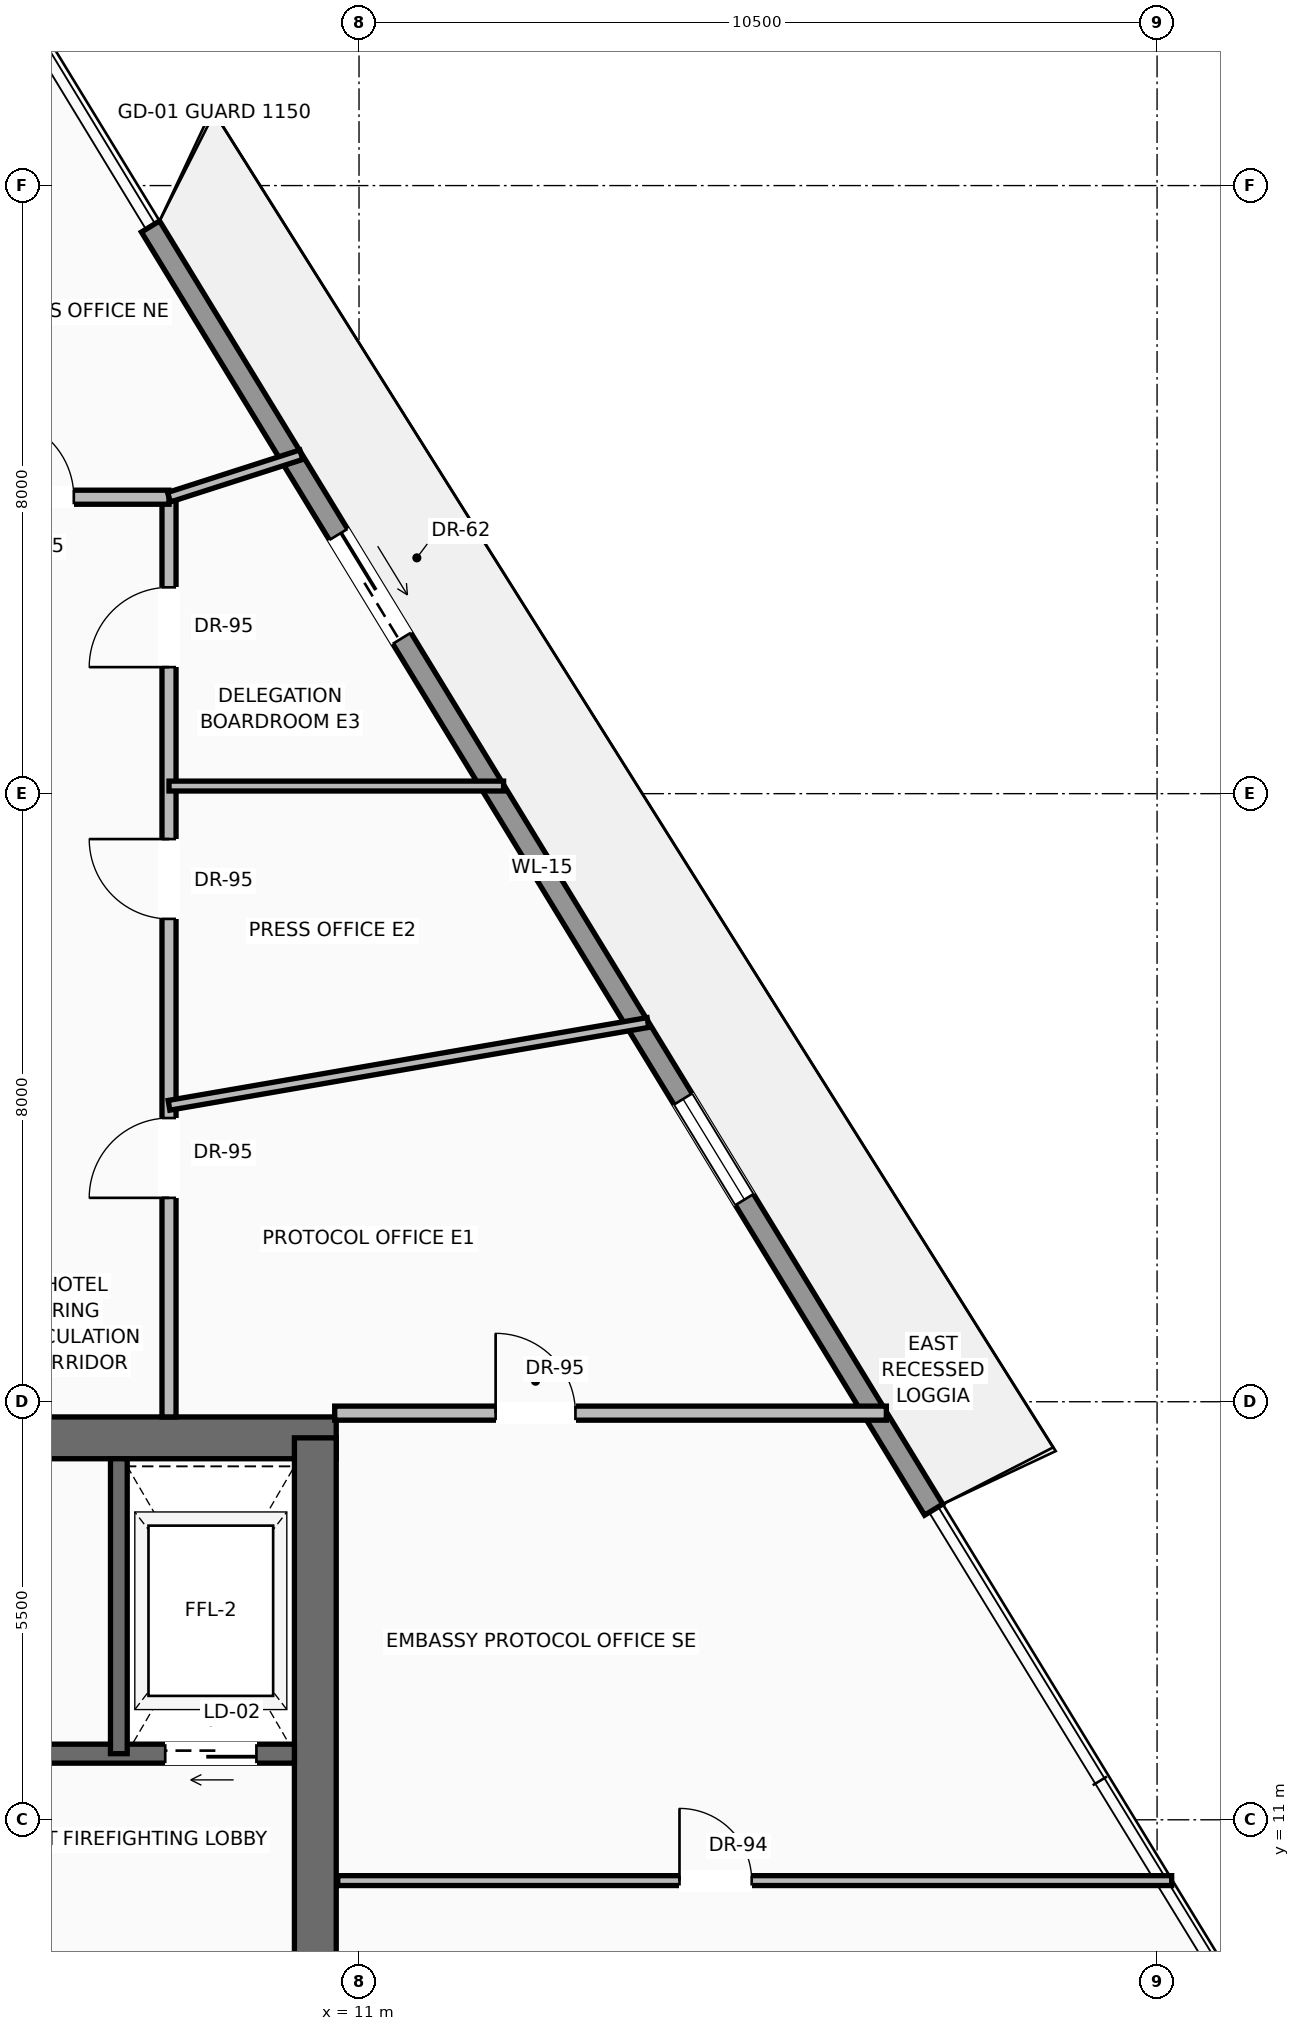
"""IFC4 building model, lengths in metres.
Left out: names, types, materials, properties, quantities, classifications, styles, units other than length and angle.
Written with IfcOpenShell. Run it as: python <this file> out.ifc"""

import sys

from ifc_helpers import new_model, si_unit, direction, frame, frame_2d, origin, place, context, subcontext, project, spatial, rectangle, extrude, source, transform, mapped, element, fill, save


model = new_model("IFC4")
c1 = context("Model", 3, precision=1e-05, world=origin(), true_north=direction((0.0, 1.0)))
c2 = subcontext(c1, "Body", "Model", "MODEL_VIEW")
j1 = project(units=[si_unit("LENGTHUNIT", "METRE"), si_unit("PLANEANGLEUNIT", "RADIAN")], contexts=[c1])
p1 = place(None, origin())
s1 = spatial("IfcSite", under=j1, at=p1, CompositionType="ELEMENT")
p2 = place(p1, origin())
s2 = spatial("IfcBuilding", under=s1, at=p2, CompositionType="ELEMENT")
p3 = place(p2, frame((0.0, 0.0, 251.05)))
s3 = spatial("IfcBuildingStorey", under=s2, at=p3, CompositionType="ELEMENT", Elevation=251.05)
p4 = place(p3, frame((-10.7, 16.025, 0.0), z_axis=(0.0, 0.0, 1.0), x_axis=(1.0, 0.0, 0.0)))
e1 = element("IfcWall", 1, at=p4, inside=s3, PredefinedType="SHEAR", context=c2, shape_type="SweptSolid", body=[
    extrude(rectangle(XDim=21.4, YDim=0.55, at=frame_2d((10.7, 0.0))), origin(), (0.0, 0.0, 1.0), 3.24),
])
p5 = place(p4, frame((3.27, 0.0, 0.0)))
e2 = element("IfcOpeningElement", 2, at=p5, cuts=e1, PredefinedType="OPENING", context=c2, shape_type="SweptSolid", body=[
    extrude(rectangle(XDim=1.3, YDim=2.3, at=frame_2d((0.65, 1.15))), frame((0.0, 0.285, 0.0), z_axis=(0.0, -1.0, 0.0), x_axis=(1.0, 0.0, 0.0)), (0.0, 0.0, 1.0), 0.57),
])
p6 = place(p4, frame((9.7, 0.0, 0.0)))
e3 = element("IfcOpeningElement", 3, at=p6, cuts=e1, PredefinedType="OPENING", context=c2, shape_type="SweptSolid", body=[
    extrude(rectangle(XDim=2.0, YDim=2.4, at=frame_2d((1.0, 1.2))), frame((0.0, 0.285, 0.0), z_axis=(0.0, -1.0, 0.0), x_axis=(1.0, 0.0, 0.0)), (0.0, 0.0, 1.0), 0.57),
])
p7 = place(p3, frame((10.425, 0.575, 0.0), z_axis=(0.0, 0.0, 1.0), x_axis=(0.0, 1.0, 0.0)))
e4 = element("IfcWall", 4, at=p7, inside=s3, PredefinedType="SHEAR", context=c2, shape_type="SweptSolid", body=[
    extrude(rectangle(XDim=15.45, YDim=0.55, at=frame_2d((7.725, 0.0))), origin(), (0.0, 0.0, 1.0), 3.24),
])
p8 = place(p3, frame((8.256, 31.961, 0.0), z_axis=(0.0, 0.0, 1.0), x_axis=(0.521016032817, -0.853546890069, 0.0)))
e5 = element("IfcWall", 5, at=p8, inside=s3, PredefinedType="SOLIDWALL", context=c2, shape_type="SweptSolid", body=[
    extrude(rectangle(XDim=19.778, YDim=0.28, at=frame_2d((9.889, 0.0))), origin(), (0.0, 0.0, 1.0), 2.82),
])
p9 = place(p8, frame((4.747, 0.0, 0.0)))
e6 = element("IfcOpeningElement", 6, at=p9, cuts=e5, PredefinedType="OPENING", context=c2, shape_type="SweptSolid", body=[
    extrude(rectangle(XDim=1.6, YDim=2.35, at=frame_2d((0.8, 1.175))), frame((0.0, 0.15, 0.0), z_axis=(0.0, -1.0, 0.0), x_axis=(1.0, 0.0, 0.0)), (0.0, 0.0, 1.0), 0.3),
])
p10 = place(p8, frame((13.449, 0.0, 0.9)))
e7 = element("IfcOpeningElement", 7, at=p10, cuts=e5, PredefinedType="OPENING", context=c2, shape_type="SweptSolid", body=[
    extrude(rectangle(XDim=1.55, YDim=1.75, at=frame_2d((0.775, 0.875))), frame((0.0, 0.15, 0.0), z_axis=(0.0, -1.0, 0.0), x_axis=(1.0, 0.0, 0.0)), (0.0, 0.0, 1.0), 0.3),
])
p11 = place(p3, frame((10.15, 11.87, 0.0), z_axis=(0.0, 0.0, 1.0), x_axis=(-1.0, 0.0, 0.0)))
e8 = element("IfcWall", 8, at=p11, inside=s3, PredefinedType="SOLIDWALL", context=c2, shape_type="SweptSolid", body=[
    extrude(rectangle(XDim=4.65, YDim=0.25, at=frame_2d((2.325, 0.0))), origin(), (0.0, 0.0, 1.0), 3.24),
])
p12 = place(p11, frame((0.5, 0.0, 0.0)))
e9 = element("IfcOpeningElement", 9, at=p12, cuts=e8, PredefinedType="OPENING", context=c2, shape_type="SweptSolid", body=[
    extrude(rectangle(XDim=1.2, YDim=2.25, at=frame_2d((0.6, 1.125))), frame((0.0, 0.135, 0.0), z_axis=(0.0, -1.0, 0.0), x_axis=(1.0, 0.0, 0.0)), (0.0, 0.0, 1.0), 0.27),
])
p13 = place(p3, frame((7.84, 11.87, 0.0), z_axis=(0.0, 0.0, 1.0), x_axis=(0.0, 1.0, 0.0)))
e10 = element("IfcWall", 10, at=p13, inside=s3, PredefinedType="SOLIDWALL", context=c2, shape_type="SweptSolid", body=[
    extrude(rectangle(XDim=3.88, YDim=0.22, at=frame_2d((1.94, 0.0))), origin(), (0.0, 0.0, 1.0), 3.24),
])
p14 = place(p3, frame((8.5, 16.3, 0.0), z_axis=(0.0, 0.0, 1.0), x_axis=(0.0, 1.0, 0.0)))
e11 = element("IfcWall", 11, at=p14, inside=s3, PredefinedType="PARTITIONING", context=c2, shape_type="SweptSolid", body=[
    extrude(rectangle(XDim=12.1, YDim=0.185, at=frame_2d((6.05, 0.0))), origin(), (0.0, 0.0, 1.0), 3.232),
])
p15 = place(p14, frame((2.882, 0.0, 0.0)))
e12 = element("IfcOpeningElement", 12, at=p15, cuts=e11, PredefinedType="OPENING", context=c2, shape_type="SweptSolid", body=[
    extrude(rectangle(XDim=1.05, YDim=2.25, at=frame_2d((0.525, 1.125))), frame((0.0, 0.103, 0.0), z_axis=(0.0, -1.0, 0.0), x_axis=(1.0, 0.0, 0.0)), (0.0, 0.0, 1.0), 0.205),
])
p16 = place(p14, frame((6.552, 0.0, 0.0)))
e13 = element("IfcOpeningElement", 13, at=p16, cuts=e11, PredefinedType="OPENING", context=c2, shape_type="SweptSolid", body=[
    extrude(rectangle(XDim=1.05, YDim=2.25, at=frame_2d((0.525, 1.125))), frame((0.0, 0.103, 0.0), z_axis=(0.0, -1.0, 0.0), x_axis=(1.0, 0.0, 0.0)), (0.0, 0.0, 1.0), 0.205),
])
p17 = place(p14, frame((9.865, 0.0, 0.0)))
e14 = element("IfcOpeningElement", 14, at=p17, cuts=e11, PredefinedType="OPENING", context=c2, shape_type="SweptSolid", body=[
    extrude(rectangle(XDim=1.05, YDim=2.25, at=frame_2d((0.525, 1.125))), frame((0.0, 0.103, 0.0), z_axis=(0.0, -1.0, 0.0), x_axis=(1.0, 0.0, 0.0)), (0.0, 0.0, 1.0), 0.205),
])
p18 = place(p3, frame((-8.3, 28.4, 0.0), z_axis=(0.0, 0.0, 1.0), x_axis=(1.0, 0.0, 0.0)))
e15 = element("IfcWall", 15, at=p18, inside=s3, PredefinedType="PARTITIONING", context=c2, shape_type="SweptSolid", body=[
    extrude(rectangle(XDim=16.8, YDim=0.185, at=frame_2d((8.4, 0.0))), origin(), (0.0, 0.0, 1.0), 3.232),
])
p19 = place(p18, frame((3.498, 0.0, 0.0)))
e16 = element("IfcOpeningElement", 16, at=p19, cuts=e15, PredefinedType="OPENING", context=c2, shape_type="SweptSolid", body=[
    extrude(rectangle(XDim=1.05, YDim=2.25, at=frame_2d((0.525, 1.125))), frame((0.0, 0.103, 0.0), z_axis=(0.0, -1.0, 0.0), x_axis=(1.0, 0.0, 0.0)), (0.0, 0.0, 1.0), 0.205),
])
p20 = place(p18, frame((8.998, 0.0, 0.0)))
e17 = element("IfcOpeningElement", 17, at=p20, cuts=e15, PredefinedType="OPENING", context=c2, shape_type="SweptSolid", body=[
    extrude(rectangle(XDim=1.05, YDim=2.25, at=frame_2d((0.525, 1.125))), frame((0.0, 0.103, 0.0), z_axis=(0.0, -1.0, 0.0), x_axis=(1.0, 0.0, 0.0)), (0.0, 0.0, 1.0), 0.205),
])
p21 = place(p18, frame((12.052, 0.0, 0.0)))
e18 = element("IfcOpeningElement", 18, at=p21, cuts=e15, PredefinedType="OPENING", context=c2, shape_type="SweptSolid", body=[
    extrude(rectangle(XDim=1.05, YDim=2.25, at=frame_2d((0.525, 1.125))), frame((0.0, 0.103, 0.0), z_axis=(0.0, -1.0, 0.0), x_axis=(1.0, 0.0, 0.0)), (0.0, 0.0, 1.0), 0.205),
])
p22 = place(p18, frame((14.498, 0.0, 0.0)))
e19 = element("IfcOpeningElement", 19, at=p22, cuts=e15, PredefinedType="OPENING", context=c2, shape_type="SweptSolid", body=[
    extrude(rectangle(XDim=1.05, YDim=2.25, at=frame_2d((0.525, 1.125))), frame((0.0, 0.103, 0.0), z_axis=(0.0, -1.0, 0.0), x_axis=(1.0, 0.0, 0.0)), (0.0, 0.0, 1.0), 0.205),
])
p23 = place(p18, frame((1.052, 0.0, 0.0)))
e20 = element("IfcOpeningElement", 20, at=p23, cuts=e15, PredefinedType="OPENING", context=c2, shape_type="SweptSolid", body=[
    extrude(rectangle(XDim=1.05, YDim=2.25, at=frame_2d((0.525, 1.125))), frame((0.0, 0.103, 0.0), z_axis=(0.0, -1.0, 0.0), x_axis=(1.0, 0.0, 0.0)), (0.0, 0.0, 1.0), 0.205),
])
p24 = place(p3, frame((10.68, 16.35, 0.0), z_axis=(0.0, 0.0, 1.0), x_axis=(1.0, 0.0, 0.0)))
e21 = element("IfcWall", 21, at=p24, inside=s3, PredefinedType="PARTITIONING", context=c2, shape_type="SweptSolid", body=[
    extrude(rectangle(XDim=7.258, YDim=0.185, at=frame_2d((3.629, 0.0))), origin(), (0.0, 0.0, 1.0), 3.232),
])
p25 = place(p24, frame((2.117, 0.0, 0.0)))
e22 = element("IfcOpeningElement", 22, at=p25, cuts=e21, PredefinedType="OPENING", context=c2, shape_type="SweptSolid", body=[
    extrude(rectangle(XDim=1.05, YDim=2.25, at=frame_2d((0.525, 1.125))), frame((0.0, 0.103, 0.0), z_axis=(0.0, -1.0, 0.0), x_axis=(1.0, 0.0, 0.0)), (0.0, 0.0, 1.0), 0.205),
])
p26 = place(p3, frame((8.5, 28.4, 0.0), z_axis=(0.0, 0.0, 1.0), x_axis=(0.952084104076, 0.305836326758, 0.0)))
e23 = element("IfcWall", 23, at=p26, inside=s3, PredefinedType="PARTITIONING", context=c2, shape_type="SweptSolid", body=[
    extrude(rectangle(XDim=1.829, YDim=0.13, at=frame_2d((0.915, 0.0))), origin(), (0.0, 0.0, 1.0), 3.232),
])
p27 = place(p3, frame((10.72, 10.2, 0.0), z_axis=(0.0, 0.0, 1.0), x_axis=(1.0, 0.0, 0.0)))
e24 = element("IfcWall", 24, at=p27, inside=s3, PredefinedType="PARTITIONING", context=c2, shape_type="SweptSolid", body=[
    extrude(rectangle(XDim=10.972, YDim=0.13, at=frame_2d((5.486, 0.0))), origin(), (0.0, 0.0, 1.0), 3.232),
])
p28 = place(p27, frame((4.496, 0.0, 0.0)))
e25 = element("IfcOpeningElement", 25, at=p28, cuts=e24, PredefinedType="OPENING", context=c2, shape_type="SweptSolid", body=[
    extrude(rectangle(XDim=0.95, YDim=2.2, at=frame_2d((0.475, 1.1))), frame((0.0, 0.075, 0.0), z_axis=(0.0, -1.0, 0.0), x_axis=(1.0, 0.0, 0.0)), (0.0, 0.0, 1.0), 0.15),
])
p29 = place(p3, frame((8.5, 20.4, 0.0), z_axis=(0.0, 0.0, 1.0), x_axis=(0.985389713948, 0.170314742887, 0.0)))
e26 = element("IfcWall", 26, at=p29, inside=s3, PredefinedType="PARTITIONING", context=c2, shape_type="SweptSolid", body=[
    extrude(rectangle(XDim=6.395, YDim=0.13, at=frame_2d((3.197, 0.0))), origin(), (0.0, 0.0, 1.0), 3.232),
])
p30 = place(p3, frame((8.5, 24.6, 0.0), z_axis=(0.0, 0.0, 1.0), x_axis=(1.0, 0.0, 0.0)))
e27 = element("IfcWall", 27, at=p30, inside=s3, PredefinedType="PARTITIONING", context=c2, shape_type="SweptSolid", body=[
    extrude(rectangle(XDim=4.402, YDim=0.13, at=frame_2d((2.201, 0.0))), origin(), (0.0, 0.0, 1.0), 2.683),
])
m1 = source(origin(), c2, "Body", "SweptSolid", [
    extrude(rectangle(XDim=1.6, YDim=2.35, at=frame_2d((0.8, 1.175))), frame((0.0, 0.025, 0.0), z_axis=(0.0, -1.0, 0.0), x_axis=(1.0, 0.0, 0.0)), (0.0, 0.0, 1.0), 0.05),
])
p31 = place(p9, origin())
e28 = element("IfcDoor", 28, at=p31, inside=s3, OperationType="SLIDING_TO_RIGHT", PredefinedType="DOOR", context=c2, shape_type="MappedRepresentation", body=[
    mapped(m1, transform((0.0, 0.0, 0.0), scale=1.0)),
])
fill(e6, e28)
m2 = source(origin(), c2, "Body", "SweptSolid", [
    extrude(rectangle(XDim=1.55, YDim=1.75, at=frame_2d((0.775, 0.875))), frame((0.0, 0.03, 0.0), z_axis=(0.0, -1.0, 0.0), x_axis=(1.0, 0.0, 0.0)), (0.0, 0.0, 1.0), 0.06),
])
p32 = place(p10, origin())
e29 = element("IfcWindow", 29, at=p32, inside=s3, PartitioningType="SINGLE_PANEL", PredefinedType="WINDOW", context=c2, shape_type="MappedRepresentation", body=[
    mapped(m2, transform((0.0, 0.0, 0.0), scale=1.0)),
])
fill(e7, e29)
m3 = source(origin(), c2, "Body", "SweptSolid", [
    extrude(rectangle(XDim=1.2, YDim=2.25, at=frame_2d((0.6, 1.125))), frame((0.0, 0.025, 0.0), z_axis=(0.0, -1.0, 0.0), x_axis=(1.0, 0.0, 0.0)), (0.0, 0.0, 1.0), 0.05),
])
p33 = place(p12, origin())
e30 = element("IfcDoor", 30, at=p33, inside=s3, OperationType="SLIDING_TO_RIGHT", PredefinedType="DOOR", context=c2, shape_type="MappedRepresentation", body=[
    mapped(m3, transform((0.0, 0.0, 0.0), scale=1.0)),
])
fill(e9, e30)
m4 = source(origin(), c2, "Body", "SweptSolid", [
    extrude(rectangle(XDim=1.05, YDim=2.25, at=frame_2d((0.525, 1.125))), frame((0.0, 0.025, 0.0), z_axis=(0.0, -1.0, 0.0), x_axis=(1.0, 0.0, 0.0)), (0.0, 0.0, 1.0), 0.05),
])
p34 = place(p25, origin())
e31 = element("IfcDoor", 31, at=p34, inside=s3, OperationType="SINGLE_SWING_LEFT", PredefinedType="DOOR", context=c2, shape_type="MappedRepresentation", body=[
    mapped(m4, transform((0.0, 0.0, 0.0), scale=1.0)),
])
fill(e22, e31)
m5 = source(origin(), c2, "Body", "SweptSolid", [
    extrude(rectangle(XDim=0.95, YDim=2.2, at=frame_2d((0.475, 1.1))), frame((0.0, 0.025, 0.0), z_axis=(0.0, -1.0, 0.0), x_axis=(1.0, 0.0, 0.0)), (0.0, 0.0, 1.0), 0.05),
])
p35 = place(p28, origin())
e32 = element("IfcDoor", 32, at=p35, inside=s3, OperationType="SINGLE_SWING_LEFT", PredefinedType="DOOR", context=c2, shape_type="MappedRepresentation", body=[
    mapped(m5, transform((0.0, 0.0, 0.0), scale=1.0)),
])
fill(e25, e32)
p36 = place(p15, origin())
e33 = element("IfcDoor", 33, at=p36, inside=s3, OperationType="SINGLE_SWING_LEFT", PredefinedType="DOOR", context=c2, shape_type="MappedRepresentation", body=[
    mapped(m4, transform((0.0, 0.0, 0.0), scale=1.0)),
])
fill(e12, e33)
p37 = place(p16, origin())
e34 = element("IfcDoor", 34, at=p37, inside=s3, OperationType="SINGLE_SWING_RIGHT", PredefinedType="DOOR", context=c2, shape_type="MappedRepresentation", body=[
    mapped(m4, transform((0.0, 0.0, 0.0), scale=1.0)),
])
fill(e13, e34)
p38 = place(p17, origin())
e35 = element("IfcDoor", 35, at=p38, inside=s3, OperationType="SINGLE_SWING_LEFT", PredefinedType="DOOR", context=c2, shape_type="MappedRepresentation", body=[
    mapped(m4, transform((0.0, 0.0, 0.0), scale=1.0)),
])
fill(e14, e35)
p39 = place(p22, origin())
e36 = element("IfcDoor", 36, at=p39, inside=s3, OperationType="SINGLE_SWING_LEFT", PredefinedType="DOOR", context=c2, shape_type="MappedRepresentation", body=[
    mapped(m4, transform((0.0, 0.0, 0.0), scale=1.0)),
])
fill(e19, e36)
save(model, sys.argv[1])
